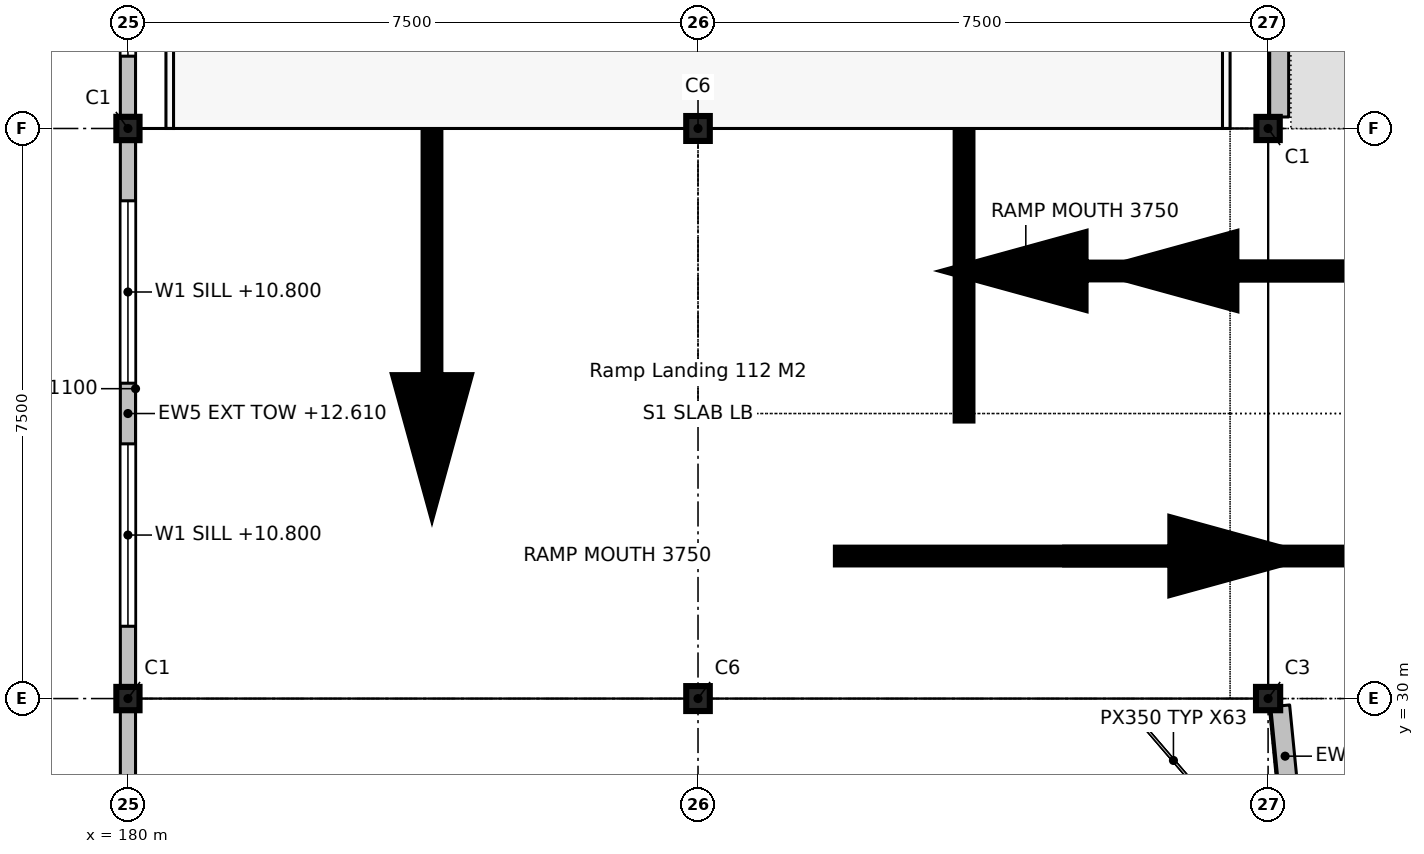
"""IFC4 building model, lengths in metres.
Left out: names, types, materials, properties, quantities, classifications, styles, units other than length and angle.
Written with IfcOpenShell. Run it as: python <this file> out.ifc"""

import sys

from ifc_helpers import new_model, si_unit, direction, frame, frame_2d, origin, origin_2d, place, context, subcontext, project, spatial, rectangle, i_section, extrude, element, fill, save


model = new_model("IFC4")
c1 = context("Model", 3, precision=1e-05, world=origin(), true_north=direction((0.0, 1.0)))
c2 = subcontext(c1, "Body", "Model", "MODEL_VIEW")
j1 = project(units=[si_unit("LENGTHUNIT", "METRE"), si_unit("PLANEANGLEUNIT", "RADIAN")], contexts=[c1])
p1 = place(None, origin())
s1 = spatial("IfcSite", under=j1, at=p1, CompositionType="ELEMENT")
p2 = place(p1, origin())
s2 = spatial("IfcBuilding", under=s1, at=p2, CompositionType="ELEMENT")
p3 = place(p2, frame((0.0, 0.0, 9.9)))
s3 = spatial("IfcBuildingStorey", under=s2, at=p3, CompositionType="ELEMENT", Elevation=9.9)
for number, where, z_axis, x_axis in (
    (1, (180.0, 30.0, 0.0), (0.0, 0.0, 1.0), (1.0, 0.0, 0.0)),
    (2, (180.0, 37.5, 0.0), (0.0, 0.0, 1.0), (1.0, 0.0, 0.0)),
):
    element("IfcColumn", number, at=place(p3, frame(where, z_axis=z_axis, x_axis=x_axis)), inside=s3, PredefinedType="COLUMN", context=c2, shape_type="SweptSolid", body=[
        extrude(i_section(OverallWidth=0.305, OverallDepth=0.307, WebThickness=0.01, FlangeThickness=0.015, FilletRadius=0.015, at=origin_2d()), origin(), (0.0, 0.0, 1.0), 3.3),
    ])
for number, where, z_axis, x_axis in (
    (3, (187.5, 30.0, 0.0), (0.0, 0.0, 1.0), (1.0, 0.0, 0.0)),
    (4, (187.5, 37.5, 0.0), (0.0, 0.0, 1.0), (1.0, 0.0, 0.0)),
):
    element("IfcColumn", number, at=place(p3, frame(where, z_axis=z_axis, x_axis=x_axis)), inside=s3, PredefinedType="COLUMN", context=c2, shape_type="SweptSolid", body=[
        extrude(i_section(OverallWidth=0.31, OverallDepth=0.328, WebThickness=0.015, FlangeThickness=0.025, FilletRadius=0.015, at=origin_2d()), origin(), (0.0, 0.0, 1.0), 3.3),
    ])
p4 = place(p3, frame((195.0, 37.5, 0.0), z_axis=(0.0, 0.0, 1.0), x_axis=(0.0, 1.0, 0.0)))
e5 = element("IfcColumn", 5, at=p4, inside=s3, PredefinedType="COLUMN", context=c2, shape_type="SweptSolid", body=[
    extrude(i_section(OverallWidth=0.305, OverallDepth=0.307, WebThickness=0.01, FlangeThickness=0.015, FilletRadius=0.015, at=origin_2d()), origin(), (0.0, 0.0, 1.0), 3.3),
])
p5 = place(p3, frame((195.0, 30.0, 0.0), z_axis=(0.0, 0.0, 1.0), x_axis=(0.0, 1.0, 0.0)))
e6 = element("IfcColumn", 6, at=p5, inside=s3, PredefinedType="COLUMN", context=c2, shape_type="SweptSolid", body=[
    extrude(i_section(OverallWidth=0.307, OverallDepth=0.318, WebThickness=0.013, FlangeThickness=0.021, FilletRadius=0.015, at=origin_2d()), origin(), (0.0, 0.0, 1.0), 3.3),
])
p6 = place(p3, frame((195.146, 44.848, 0.0), z_axis=(0.0, 0.0, 1.0), x_axis=(0.0, -1.0, 0.0)))
e7 = element("IfcWall", 7, at=p6, inside=s3, PredefinedType="SOLIDWALL", context=c2, shape_type="SweptSolid", body=[
    extrude(rectangle(XDim=7.197, YDim=0.25, at=frame_2d((3.598, 0.0))), origin(), (0.0, 0.0, 1.0), 1.1),
])
p7 = place(p3, frame((195.159, 29.904, 0.0), z_axis=(0.0, 0.0, 1.0), x_axis=(0.098067173263, -0.995179797588, 0.0)))
e8 = element("IfcWall", 8, at=p7, inside=s3, PredefinedType="SOLIDWALL", context=c2, shape_type="SweptSolid", body=[
    extrude(rectangle(XDim=1.329, YDim=0.25, at=frame_2d((0.665, 0.0))), origin(), (0.0, 0.0, 1.0), 1.1),
])
p8 = place(p3, frame((180.0, 22.654, 0.0), z_axis=(0.0, 0.0, 1.0), x_axis=(0.0, 1.0, 0.0)))
e9 = element("IfcWall", 9, at=p8, inside=s3, PredefinedType="SOLIDWALL", context=c2, shape_type="SweptSolid", body=[
    extrude(rectangle(XDim=7.193, YDim=0.2, at=frame_2d((3.596, 0.0))), origin(), (0.0, 0.0, 1.0), 2.71),
])
p9 = place(p8, frame((1.098, 0.0, 1.1)))
e10 = element("IfcOpeningElement", 10, at=p9, cuts=e9, PredefinedType="OPENING", context=c2, shape_type="SweptSolid", body=[
    extrude(rectangle(XDim=1.8, YDim=1.4, at=frame_2d((0.9, 0.7))), frame((0.0, 0.11, 0.0), z_axis=(0.0, -1.0, 0.0), x_axis=(1.0, 0.0, 0.0)), (0.0, 0.0, 1.0), 0.22),
])
p10 = place(p8, frame((4.295, 0.0, 1.1)))
e11 = element("IfcOpeningElement", 11, at=p10, cuts=e9, PredefinedType="OPENING", context=c2, shape_type="SweptSolid", body=[
    extrude(rectangle(XDim=1.8, YDim=1.4, at=frame_2d((0.9, 0.7))), frame((0.0, 0.11, 0.0), z_axis=(0.0, -1.0, 0.0), x_axis=(1.0, 0.0, 0.0)), (0.0, 0.0, 1.0), 0.22),
])
p11 = place(p3, frame((180.0, 30.154, 0.0), z_axis=(0.0, 0.0, 1.0), x_axis=(0.0, 1.0, 0.0)))
e12 = element("IfcWall", 12, at=p11, inside=s3, PredefinedType="SOLIDWALL", context=c2, shape_type="SweptSolid", body=[
    extrude(rectangle(XDim=7.193, YDim=0.2, at=frame_2d((3.596, 0.0))), origin(), (0.0, 0.0, 1.0), 2.71),
])
p12 = place(p11, frame((0.798, 0.0, 0.9)))
e13 = element("IfcOpeningElement", 13, at=p12, cuts=e12, PredefinedType="OPENING", context=c2, shape_type="SweptSolid", body=[
    extrude(rectangle(XDim=2.4, YDim=1.5, at=frame_2d((1.2, 0.75))), frame((0.0, 0.11, 0.0), z_axis=(0.0, -1.0, 0.0), x_axis=(1.0, 0.0, 0.0)), (0.0, 0.0, 1.0), 0.22),
])
p13 = place(p11, frame((3.995, 0.0, 0.9)))
e14 = element("IfcOpeningElement", 14, at=p13, cuts=e12, PredefinedType="OPENING", context=c2, shape_type="SweptSolid", body=[
    extrude(rectangle(XDim=2.4, YDim=1.5, at=frame_2d((1.2, 0.75))), frame((0.0, 0.11, 0.0), z_axis=(0.0, -1.0, 0.0), x_axis=(1.0, 0.0, 0.0)), (0.0, 0.0, 1.0), 0.22),
])
p14 = place(p3, frame((180.0, 37.654, 0.0), z_axis=(0.0, 0.0, 1.0), x_axis=(0.0, 1.0, 0.0)))
e15 = element("IfcWall", 15, at=p14, inside=s3, PredefinedType="SOLIDWALL", context=c2, shape_type="SweptSolid", body=[
    extrude(rectangle(XDim=7.193, YDim=0.2, at=frame_2d((3.596, 0.0))), origin(), (0.0, 0.0, 1.0), 2.71),
])
p15 = place(p14, frame((0.798, 0.0, 0.9)))
e16 = element("IfcOpeningElement", 16, at=p15, cuts=e15, PredefinedType="OPENING", context=c2, shape_type="SweptSolid", body=[
    extrude(rectangle(XDim=2.4, YDim=1.5, at=frame_2d((1.2, 0.75))), frame((0.0, 0.11, 0.0), z_axis=(0.0, -1.0, 0.0), x_axis=(1.0, 0.0, 0.0)), (0.0, 0.0, 1.0), 0.22),
])
p16 = place(p14, frame((3.995, 0.0, 0.9)))
e17 = element("IfcOpeningElement", 17, at=p16, cuts=e15, PredefinedType="OPENING", context=c2, shape_type="SweptSolid", body=[
    extrude(rectangle(XDim=2.4, YDim=1.5, at=frame_2d((1.2, 0.75))), frame((0.0, 0.11, 0.0), z_axis=(0.0, -1.0, 0.0), x_axis=(1.0, 0.0, 0.0)), (0.0, 0.0, 1.0), 0.22),
])
p17 = place(p12, origin())
e18 = element("IfcWindow", 18, at=p17, inside=s3, PartitioningType="DOUBLE_PANEL_VERTICAL", PredefinedType="WINDOW", context=c2, shape_type="SweptSolid", body=[
    extrude(rectangle(XDim=2.4, YDim=1.5, at=frame_2d((1.2, 0.75))), frame((0.0, 0.03, 0.0), z_axis=(0.0, -1.0, 0.0), x_axis=(1.0, 0.0, 0.0)), (0.0, 0.0, 1.0), 0.06),
])
fill(e13, e18)
p18 = place(p13, origin())
e19 = element("IfcWindow", 19, at=p18, inside=s3, PartitioningType="DOUBLE_PANEL_VERTICAL", PredefinedType="WINDOW", context=c2, shape_type="SweptSolid", body=[
    extrude(rectangle(XDim=2.4, YDim=1.5, at=frame_2d((1.2, 0.75))), frame((0.0, 0.03, 0.0), z_axis=(0.0, -1.0, 0.0), x_axis=(1.0, 0.0, 0.0)), (0.0, 0.0, 1.0), 0.06),
])
fill(e14, e19)
p19 = place(p15, origin())
e20 = element("IfcWindow", 20, at=p19, inside=s3, PartitioningType="DOUBLE_PANEL_VERTICAL", PredefinedType="WINDOW", context=c2, shape_type="SweptSolid", body=[
    extrude(rectangle(XDim=2.4, YDim=1.5, at=frame_2d((1.2, 0.75))), frame((0.0, 0.03, 0.0), z_axis=(0.0, -1.0, 0.0), x_axis=(1.0, 0.0, 0.0)), (0.0, 0.0, 1.0), 0.06),
])
fill(e16, e20)
save(model, sys.argv[1])
